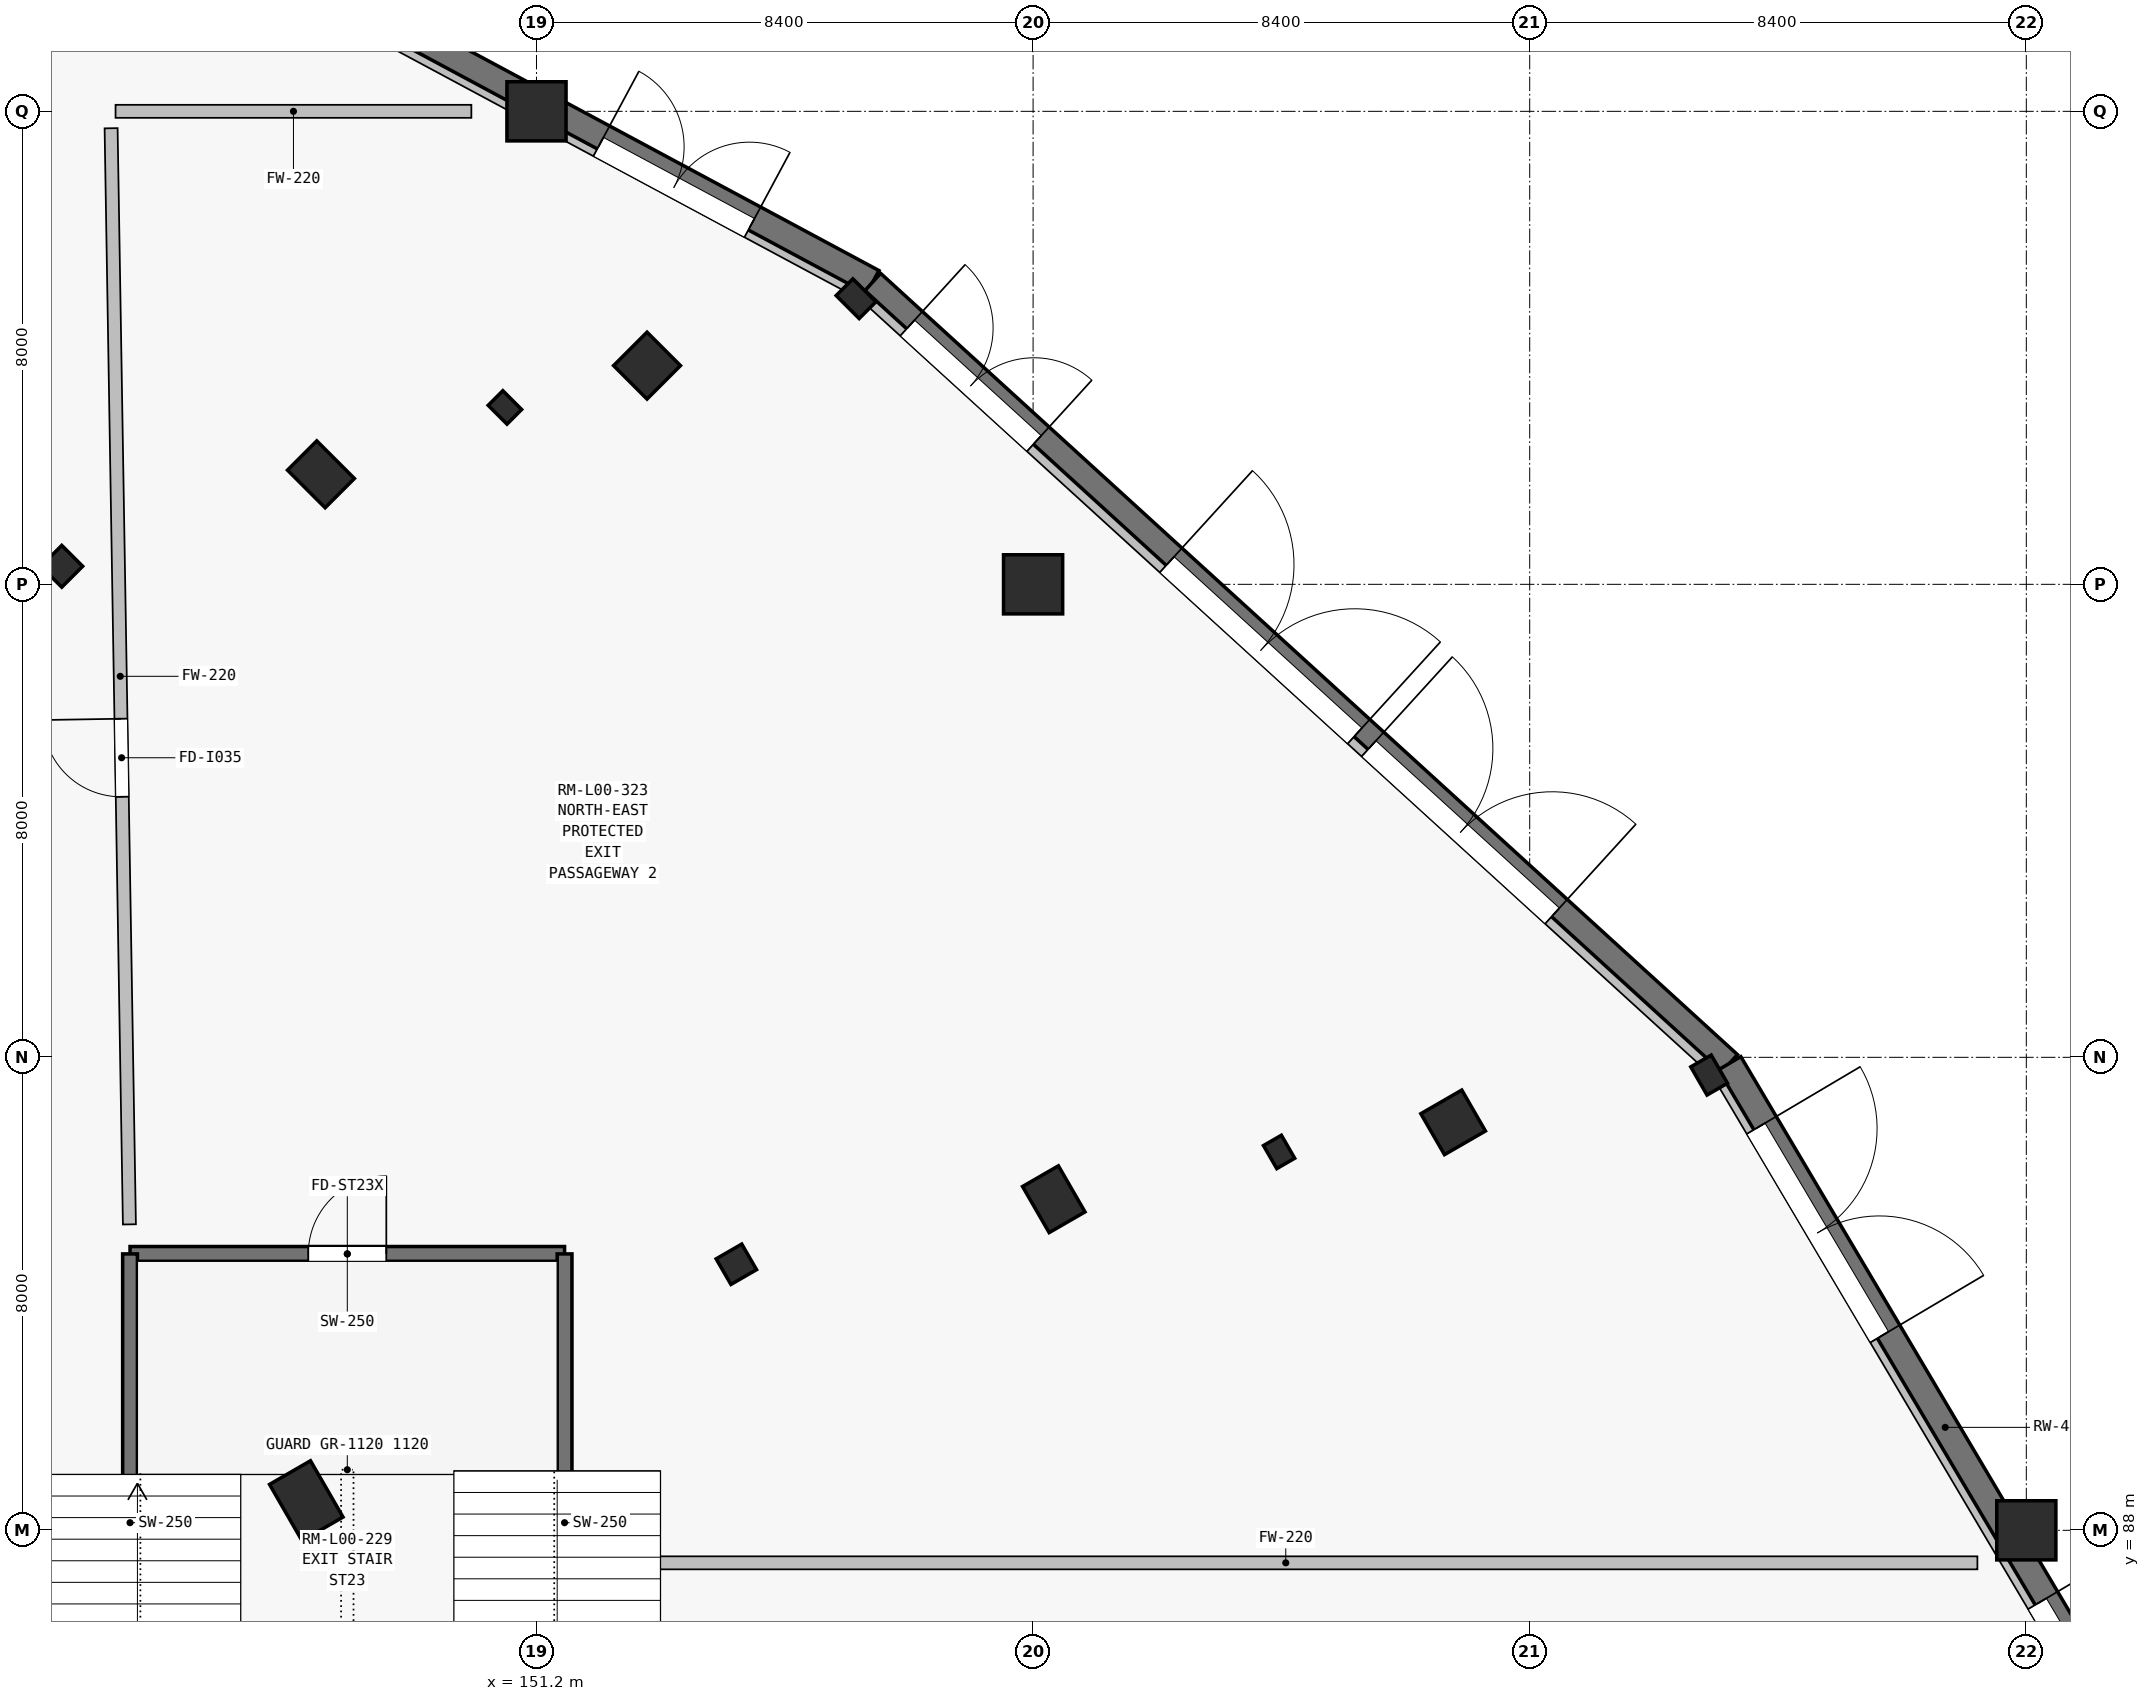
"""IFC4 building model, lengths in metres.
Left out: names, types, materials, properties, quantities, classifications, styles, units other than length and angle.
Written with IfcOpenShell. Run it as: python <this file> out.ifc"""

import sys

from ifc_helpers import new_model, si_unit, direction, frame, frame_2d, origin, origin_2d, place, context, subcontext, project, spatial, rectangle, i_section, extrude, element, fill, save


model = new_model("IFC4")
c1 = context("Model", 3, precision=1e-05, world=origin(), true_north=direction((0.0, 1.0)))
c2 = subcontext(c1, "Body", "Model", "MODEL_VIEW")
j1 = project(units=[si_unit("LENGTHUNIT", "METRE"), si_unit("PLANEANGLEUNIT", "RADIAN")], contexts=[c1])
p1 = place(None, origin())
s1 = spatial("IfcSite", under=j1, at=p1, CompositionType="ELEMENT")
p2 = place(p1, origin())
s2 = spatial("IfcBuilding", under=s1, at=p2, CompositionType="ELEMENT")
p3 = place(p2, origin())
s3 = spatial("IfcBuildingStorey", under=s2, at=p3, CompositionType="ELEMENT", Elevation=0.0)
p4 = place(p3, frame((147.306, 88.5, 0.0), z_axis=(0.0, 0.0, 1.0), x_axis=(0.866025403784, 0.5, 0.0)))
e1 = element("IfcColumn", 1, at=p4, inside=s3, PredefinedType="COLUMN", context=c2, shape_type="SweptSolid", body=[
    extrude(rectangle(XDim=0.8, YDim=1.1, at=origin_2d()), origin(), (0.0, 0.0, 1.0), 5.4),
])
for number, where, z_axis, x_axis in (
    (2, (154.581, 92.5, 0.0), (0.0, 0.0, 1.0), (0.866, 0.5, 0.0)),
    (3, (143.17, 104.305, 0.0), (0.0, 0.0, 1.0), (0.707, 0.707, 0.0)),
):
    element("IfcColumn", number, at=place(p3, frame(where, z_axis=z_axis, x_axis=x_axis)), inside=s3, PredefinedType="COLUMN", context=c2, shape_type="SweptSolid", body=[
        extrude(i_section(OverallWidth=0.5, OverallDepth=0.5, WebThickness=0.02, FlangeThickness=0.035, at=origin_2d()), origin(), (0.0, 0.0, 1.0), 5.4),
    ])
for number, where, z_axis, x_axis in (
    (4, (159.95, 93.6, 0.0), (0.0, 0.0, 1.0), (0.866, 0.5, 0.0)),
    (5, (147.554, 105.861, 0.0), (0.0, 0.0, 1.0), (0.707, 0.707, 0.0)),
):
    element("IfcColumn", number, at=place(p3, frame(where, z_axis=z_axis, x_axis=x_axis)), inside=s3, PredefinedType="COLUMN", context=c2, shape_type="SweptSolid", body=[
        extrude(rectangle(XDim=0.7, YDim=0.9, at=origin_2d()), origin(), (0.0, 0.0, 1.0), 5.4),
    ])
for number, where, z_axis, x_axis in (
    (6, (166.705, 94.9, 0.0), (0.0, 0.0, 1.0), (0.866, 0.5, 0.0)),
    (7, (153.07, 107.699, 0.0), (0.0, 0.0, 1.0), (0.707, 0.707, 0.0)),
):
    element("IfcColumn", number, at=place(p3, frame(where, z_axis=z_axis, x_axis=x_axis)), inside=s3, PredefinedType="COLUMN", context=c2, shape_type="SweptSolid", body=[
        extrude(rectangle(XDim=0.8, YDim=0.8, at=origin_2d()), origin(), (0.0, 0.0, 1.0), 5.4),
    ])
for number, where, z_axis, x_axis in (
    (8, (151.2, 112.0, 0.0), (0.0, 0.0, 1.0), (1.0, 0.0, 0.0)),
    (9, (159.6, 104.0, 0.0), (0.0, 0.0, 1.0), (1.0, 0.0, 0.0)),
):
    element("IfcColumn", number, at=place(p3, frame(where, z_axis=z_axis, x_axis=x_axis)), inside=s3, PredefinedType="COLUMN", context=c2, shape_type="SweptSolid", body=[
        extrude(rectangle(XDim=1.0, YDim=1.0, at=origin_2d()), origin(), (0.0, 0.0, 1.0), 5.15),
    ])
p5 = place(p3, frame((176.4, 88.0, 0.0), z_axis=(0.0, 0.0, 1.0), x_axis=(1.0, 0.0, 0.0)))
e10 = element("IfcColumn", 10, at=p5, inside=s3, PredefinedType="COLUMN", context=c2, shape_type="SweptSolid", body=[
    extrude(rectangle(XDim=1.0, YDim=1.0, at=origin_2d()), origin(), (0.0, 0.0, 1.0), 5.12),
])
for number, where, z_axis, x_axis in (
    (11, (171.035, 95.7, 0.0), (0.0, 0.0, 1.0), (0.866, 0.5, 0.0)),
    (12, (156.605, 108.831, 0.0), (0.0, 0.0, 1.0), (0.707, 0.707, 0.0)),
):
    element("IfcColumn", number, at=place(p3, frame(where, z_axis=z_axis, x_axis=x_axis)), inside=s3, PredefinedType="PILASTER", context=c2, shape_type="SweptSolid", body=[
        extrude(rectangle(XDim=0.4, YDim=0.55, at=origin_2d()), origin(), (0.0, 0.0, 1.0), 6.35),
    ])
for number, where, z_axis, x_axis in (
    (13, (163.761, 94.4, 0.0), (0.0, 0.0, 1.0), (0.866, 0.5, 0.0)),
    (14, (150.666, 106.992, 0.0), (0.0, 0.0, 1.0), (0.707, 0.707, 0.0)),
):
    element("IfcColumn", number, at=place(p3, frame(where, z_axis=z_axis, x_axis=x_axis)), inside=s3, PredefinedType="PILASTER", context=c2, shape_type="SweptSolid", body=[
        extrude(rectangle(XDim=0.35, YDim=0.45, at=origin_2d()), origin(), (0.0, 0.0, 1.0), 5.4),
    ])
p6 = place(p3, frame((137.877, 119.114, 0.0), z_axis=(0.0, 0.0, 1.0), x_axis=(0.881084068803, -0.47295968507, 0.0)))
e15 = element("IfcWall", 15, at=p6, inside=s3, PredefinedType="SOLIDWALL", context=c2, shape_type="SweptSolid", body=[
    extrude(rectangle(XDim=21.524, YDim=0.36, at=frame_2d((10.762, 0.0))), origin(), (0.0, 0.0, 1.0), 5.15),
])
p7 = place(p6, frame((16.31, 0.0, 0.0)))
e16 = element("IfcOpeningElement", 16, at=p7, cuts=e15, PredefinedType="OPENING", context=c2, shape_type="SweptSolid", body=[
    extrude(rectangle(XDim=2.9, YDim=2.55, at=frame_2d((1.45, 1.275))), frame((0.0, 0.19, 0.0), z_axis=(0.0, -1.0, 0.0), x_axis=(1.0, 0.0, 0.0)), (0.0, 0.0, 1.0), 0.38),
])
p8 = place(p6, frame((9.037, 0.0, 0.0)))
e17 = element("IfcOpeningElement", 17, at=p8, cuts=e15, PredefinedType="OPENING", context=c2, shape_type="SweptSolid", body=[
    extrude(rectangle(XDim=3.45, YDim=2.6, at=frame_2d((1.725, 1.3))), frame((0.0, 0.19, 0.0), z_axis=(0.0, -1.0, 0.0), x_axis=(1.0, 0.0, 0.0)), (0.0, 0.0, 1.0), 0.38),
])
p9 = place(p6, frame((1.22, 0.0, 0.0)))
e18 = element("IfcOpeningElement", 18, at=p9, cuts=e15, PredefinedType="OPENING", context=c2, shape_type="SweptSolid", body=[
    extrude(rectangle(XDim=4.1, YDim=2.7, at=frame_2d((2.05, 1.35))), frame((0.0, 0.19, 0.0), z_axis=(0.0, -1.0, 0.0), x_axis=(1.0, 0.0, 0.0)), (0.0, 0.0, 1.0), 0.38),
])
p10 = place(p6, frame((5.62, 0.0, 0.0)))
e19 = element("IfcOpeningElement", 19, at=p10, cuts=e15, PredefinedType="OPENING", context=c2, shape_type="SweptSolid", body=[
    extrude(rectangle(XDim=2.9, YDim=2.55, at=frame_2d((1.45, 1.275))), frame((0.0, 0.19, 0.0), z_axis=(0.0, -1.0, 0.0), x_axis=(1.0, 0.0, 0.0)), (0.0, 0.0, 1.0), 0.38),
])
p11 = place(p3, frame((156.735, 109.01, 0.0), z_axis=(0.0, 0.0, 1.0), x_axis=(0.73898542478, -0.673721412724, 0.0)))
e20 = element("IfcWall", 20, at=p11, inside=s3, PredefinedType="SOLIDWALL", context=c2, shape_type="SweptSolid", body=[
    extrude(rectangle(XDim=19.699, YDim=0.36, at=frame_2d((9.85, 0.0))), origin(), (0.0, 0.0, 1.0), 5.15),
])
p12 = place(p11, frame((6.94, 0.0, 0.0)))
e21 = element("IfcOpeningElement", 21, at=p12, cuts=e20, PredefinedType="OPENING", context=c2, shape_type="SweptSolid", body=[
    extrude(rectangle(XDim=4.3, YDim=2.75, at=frame_2d((2.15, 1.375))), frame((0.0, 0.19, 0.0), z_axis=(0.0, -1.0, 0.0), x_axis=(1.0, 0.0, 0.0)), (0.0, 0.0, 1.0), 0.38),
])
p13 = place(p11, frame((11.56, 0.0, 0.0)))
e22 = element("IfcOpeningElement", 22, at=p13, cuts=e20, PredefinedType="OPENING", context=c2, shape_type="SweptSolid", body=[
    extrude(rectangle(XDim=4.2, YDim=2.7, at=frame_2d((2.1, 1.35))), frame((0.0, 0.19, 0.0), z_axis=(0.0, -1.0, 0.0), x_axis=(1.0, 0.0, 0.0)), (0.0, 0.0, 1.0), 0.38),
])
p14 = place(p11, frame((1.0, 0.0, 0.0)))
e23 = element("IfcOpeningElement", 23, at=p14, cuts=e20, PredefinedType="OPENING", context=c2, shape_type="SweptSolid", body=[
    extrude(rectangle(XDim=2.9, YDim=2.55, at=frame_2d((1.45, 1.275))), frame((0.0, 0.19, 0.0), z_axis=(0.0, -1.0, 0.0), x_axis=(1.0, 0.0, 0.0)), (0.0, 0.0, 1.0), 0.38),
])
p15 = place(p3, frame((171.205, 95.845, 0.0), z_axis=(0.0, 0.0, 1.0), x_axis=(0.509495845346, -0.860473116126, 0.0)))
e24 = element("IfcWall", 24, at=p15, inside=s3, PredefinedType="SOLIDWALL", context=c2, shape_type="SweptSolid", body=[
    extrude(rectangle(XDim=17.969, YDim=0.36, at=frame_2d((8.984, 0.0))), origin(), (0.0, 0.0, 1.0), 5.15),
])
p16 = place(p15, frame((10.56, 0.0, 0.0)))
e25 = element("IfcOpeningElement", 25, at=p16, cuts=e24, PredefinedType="OPENING", context=c2, shape_type="SweptSolid", body=[
    extrude(rectangle(XDim=2.9, YDim=2.55, at=frame_2d((1.45, 1.275))), frame((0.0, 0.19, 0.0), z_axis=(0.0, -1.0, 0.0), x_axis=(1.0, 0.0, 0.0)), (0.0, 0.0, 1.0), 0.38),
])
p17 = place(p15, frame((1.22, 0.0, 0.0)))
e26 = element("IfcOpeningElement", 26, at=p17, cuts=e24, PredefinedType="OPENING", context=c2, shape_type="SweptSolid", body=[
    extrude(rectangle(XDim=4.1, YDim=2.7, at=frame_2d((2.05, 1.35))), frame((0.0, 0.19, 0.0), z_axis=(0.0, -1.0, 0.0), x_axis=(1.0, 0.0, 0.0)), (0.0, 0.0, 1.0), 0.38),
])
p18 = place(p15, frame((13.76, 0.0, 0.0)))
e27 = element("IfcOpeningElement", 27, at=p18, cuts=e24, PredefinedType="OPENING", context=c2, shape_type="SweptSolid", body=[
    extrude(rectangle(XDim=2.9, YDim=2.55, at=frame_2d((1.45, 1.275))), frame((0.0, 0.19, 0.0), z_axis=(0.0, -1.0, 0.0), x_axis=(1.0, 0.0, 0.0)), (0.0, 0.0, 1.0), 0.38),
])
p19 = place(p3, frame((138.0, 119.252, -4.5), z_axis=(0.0, 0.0, 1.0), x_axis=(0.881081793717, -0.472963923339, 0.0)))
e28 = element("IfcWall", 28, at=p19, inside=s3, PredefinedType="USERDEFINED", context=c2, shape_type="SweptSolid", body=[
    extrude(rectangle(XDim=21.438, YDim=0.44, at=frame_2d((10.719, 0.0))), origin(), (0.0, 0.0, 1.0), 4.5),
])
p20 = place(p3, frame((156.888, 109.113, -4.5), z_axis=(0.0, 0.0, 1.0), x_axis=(0.73898628446, -0.673720469764, 0.0)))
e29 = element("IfcWall", 29, at=p20, inside=s3, PredefinedType="USERDEFINED", context=c2, shape_type="SweptSolid", body=[
    extrude(rectangle(XDim=19.613, YDim=0.395, at=frame_2d((9.806, 0.0))), origin(), (0.0, 0.0, 1.0), 4.5),
])
p21 = place(p3, frame((171.382, 95.9, -4.5), z_axis=(0.0, 0.0, 1.0), x_axis=(0.509491740649, -0.86047554655, 0.0)))
e30 = element("IfcWall", 30, at=p21, inside=s3, PredefinedType="USERDEFINED", context=c2, shape_type="SweptSolid", body=[
    extrude(rectangle(XDim=17.882, YDim=0.44, at=frame_2d((8.941, 0.0))), origin(), (0.0, 0.0, 1.0), 4.5),
])
p22 = place(p3, frame((144.325, 92.675, 0.0), z_axis=(0.0, 0.0, 1.0), x_axis=(1.0, 0.0, 0.0)))
e31 = element("IfcWall", 31, at=p22, inside=s3, PredefinedType="SHEAR", context=c2, shape_type="SweptSolid", body=[
    extrude(rectangle(XDim=7.35, YDim=0.25, at=frame_2d((3.675, 0.0))), origin(), (0.0, 0.0, 1.0), 5.4),
])
p23 = place(p22, frame((3.015, 0.0, 0.0)))
e32 = element("IfcOpeningElement", 32, at=p23, cuts=e31, PredefinedType="OPENING", context=c2, shape_type="SweptSolid", body=[
    extrude(rectangle(XDim=1.32, YDim=2.2, at=frame_2d((0.66, 1.1))), frame((0.0, 0.135, 0.0), z_axis=(0.0, -1.0, 0.0), x_axis=(1.0, 0.0, 0.0)), (0.0, 0.0, 1.0), 0.27),
])
for number, where, z_axis, x_axis in (
    (33, (144.325, 79.925, 0.0), (0.0, 0.0, 1.0), (0.0, 1.0, 0.0)),
    (34, (151.675, 79.925, 0.0), (0.0, 0.0, 1.0), (0.0, 1.0, 0.0)),
):
    element("IfcWall", number, at=place(p3, frame(where, z_axis=z_axis, x_axis=x_axis)), inside=s3, PredefinedType="SHEAR", context=c2, shape_type="SweptSolid", body=[
        extrude(rectangle(XDim=12.75, YDim=0.25, at=frame_2d((6.375, 0.0))), origin(), (0.0, 0.0, 1.0), 5.4),
    ])
p24 = place(p3, frame((152.175, 87.45, 0.0), z_axis=(0.0, 0.0, 1.0), x_axis=(1.0, 0.0, 0.0)))
e35 = element("IfcWall", 35, at=p24, inside=s3, PredefinedType="SOLIDWALL", context=c2, shape_type="SweptSolid", body=[
    extrude(rectangle(XDim=23.397, YDim=0.22, at=frame_2d((11.699, 0.0))), origin(), (0.0, 0.0, 1.0), 4.295),
])
p25 = place(p3, frame((144.08, 112.0, 0.0), z_axis=(0.0, 0.0, 1.0), x_axis=(1.0, 0.0, 0.0)))
e36 = element("IfcWall", 36, at=p25, inside=s3, PredefinedType="SOLIDWALL", context=c2, shape_type="SweptSolid", body=[
    extrude(rectangle(XDim=6.019, YDim=0.22, at=frame_2d((3.009, 0.0))), origin(), (0.0, 0.0, 1.0), 5.12),
])
p26 = place(p3, frame((144.314, 93.175, 0.0), z_axis=(0.0, 0.0, 1.0), x_axis=(-0.016708668232, 0.999860400459, 0.0)))
e37 = element("IfcWall", 37, at=p26, inside=s3, PredefinedType="SOLIDWALL", context=c2, shape_type="SweptSolid", body=[
    extrude(rectangle(XDim=18.542, YDim=0.22, at=frame_2d((9.271, 0.0))), origin(), (0.0, 0.0, 1.0), 4.295),
])
p27 = place(p26, frame((7.233, 0.0, 0.0)))
e38 = element("IfcOpeningElement", 38, at=p27, cuts=e37, PredefinedType="OPENING", context=c2, shape_type="SweptSolid", body=[
    extrude(rectangle(XDim=1.32, YDim=2.2, at=frame_2d((0.66, 1.1))), frame((0.0, 0.12, 0.0), z_axis=(0.0, -1.0, 0.0), x_axis=(1.0, 0.0, 0.0)), (0.0, 0.0, 1.0), 0.24),
])
p28 = place(p16, origin())
e39 = element("IfcDoor", 39, at=p28, inside=s3, OperationType="DOUBLE_DOOR_SINGLE_SWING", PredefinedType="DOOR", context=c2, shape_type="SweptSolid", body=[
    extrude(rectangle(XDim=2.9, YDim=2.55, at=frame_2d((1.45, 1.275))), frame((0.0, 0.025, 0.0), z_axis=(0.0, -1.0, 0.0), x_axis=(1.0, 0.0, 0.0)), (0.0, 0.0, 1.0), 0.05),
])
fill(e25, e39)
p29 = place(p7, origin())
e40 = element("IfcDoor", 40, at=p29, inside=s3, OperationType="DOUBLE_DOOR_SINGLE_SWING", PredefinedType="DOOR", context=c2, shape_type="SweptSolid", body=[
    extrude(rectangle(XDim=2.9, YDim=2.55, at=frame_2d((1.45, 1.275))), frame((0.0, 0.025, 0.0), z_axis=(0.0, -1.0, 0.0), x_axis=(1.0, 0.0, 0.0)), (0.0, 0.0, 1.0), 0.05),
])
fill(e16, e40)
p30 = place(p12, origin())
e41 = element("IfcDoor", 41, at=p30, inside=s3, OperationType="DOUBLE_DOOR_SINGLE_SWING", PredefinedType="DOOR", context=c2, shape_type="SweptSolid", body=[
    extrude(rectangle(XDim=4.3, YDim=2.75, at=frame_2d((2.15, 1.375))), frame((0.0, 0.025, 0.0), z_axis=(0.0, -1.0, 0.0), x_axis=(1.0, 0.0, 0.0)), (0.0, 0.0, 1.0), 0.05),
])
fill(e21, e41)
p31 = place(p13, origin())
e42 = element("IfcDoor", 42, at=p31, inside=s3, OperationType="DOUBLE_DOOR_SINGLE_SWING", PredefinedType="DOOR", context=c2, shape_type="SweptSolid", body=[
    extrude(rectangle(XDim=4.2, YDim=2.7, at=frame_2d((2.1, 1.35))), frame((0.0, 0.025, 0.0), z_axis=(0.0, -1.0, 0.0), x_axis=(1.0, 0.0, 0.0)), (0.0, 0.0, 1.0), 0.05),
])
fill(e22, e42)
p32 = place(p17, origin())
e43 = element("IfcDoor", 43, at=p32, inside=s3, OperationType="DOUBLE_DOOR_SINGLE_SWING", PredefinedType="DOOR", context=c2, shape_type="SweptSolid", body=[
    extrude(rectangle(XDim=4.1, YDim=2.7, at=frame_2d((2.05, 1.35))), frame((0.0, 0.025, 0.0), z_axis=(0.0, -1.0, 0.0), x_axis=(1.0, 0.0, 0.0)), (0.0, 0.0, 1.0), 0.05),
])
fill(e26, e43)
p33 = place(p14, origin())
e44 = element("IfcDoor", 44, at=p33, inside=s3, OperationType="DOUBLE_DOOR_SINGLE_SWING", PredefinedType="DOOR", context=c2, shape_type="SweptSolid", body=[
    extrude(rectangle(XDim=2.9, YDim=2.55, at=frame_2d((1.45, 1.275))), frame((0.0, 0.025, 0.0), z_axis=(0.0, -1.0, 0.0), x_axis=(1.0, 0.0, 0.0)), (0.0, 0.0, 1.0), 0.05),
])
fill(e23, e44)
p34 = place(p23, origin())
e45 = element("IfcDoor", 45, at=p34, inside=s3, OperationType="SINGLE_SWING_RIGHT", PredefinedType="DOOR", context=c2, shape_type="SweptSolid", body=[
    extrude(rectangle(XDim=1.32, YDim=2.2, at=frame_2d((0.66, 1.1))), frame((0.0, 0.025, 0.0), z_axis=(0.0, -1.0, 0.0), x_axis=(1.0, 0.0, 0.0)), (0.0, 0.0, 1.0), 0.05),
])
fill(e32, e45)
p35 = place(p27, origin())
e46 = element("IfcDoor", 46, at=p35, inside=s3, OperationType="SINGLE_SWING_RIGHT", PredefinedType="DOOR", context=c2, shape_type="SweptSolid", body=[
    extrude(rectangle(XDim=1.32, YDim=2.2, at=frame_2d((0.66, 1.1))), frame((0.0, 0.025, 0.0), z_axis=(0.0, -1.0, 0.0), x_axis=(1.0, 0.0, 0.0)), (0.0, 0.0, 1.0), 0.05),
])
fill(e38, e46)
save(model, sys.argv[1])
